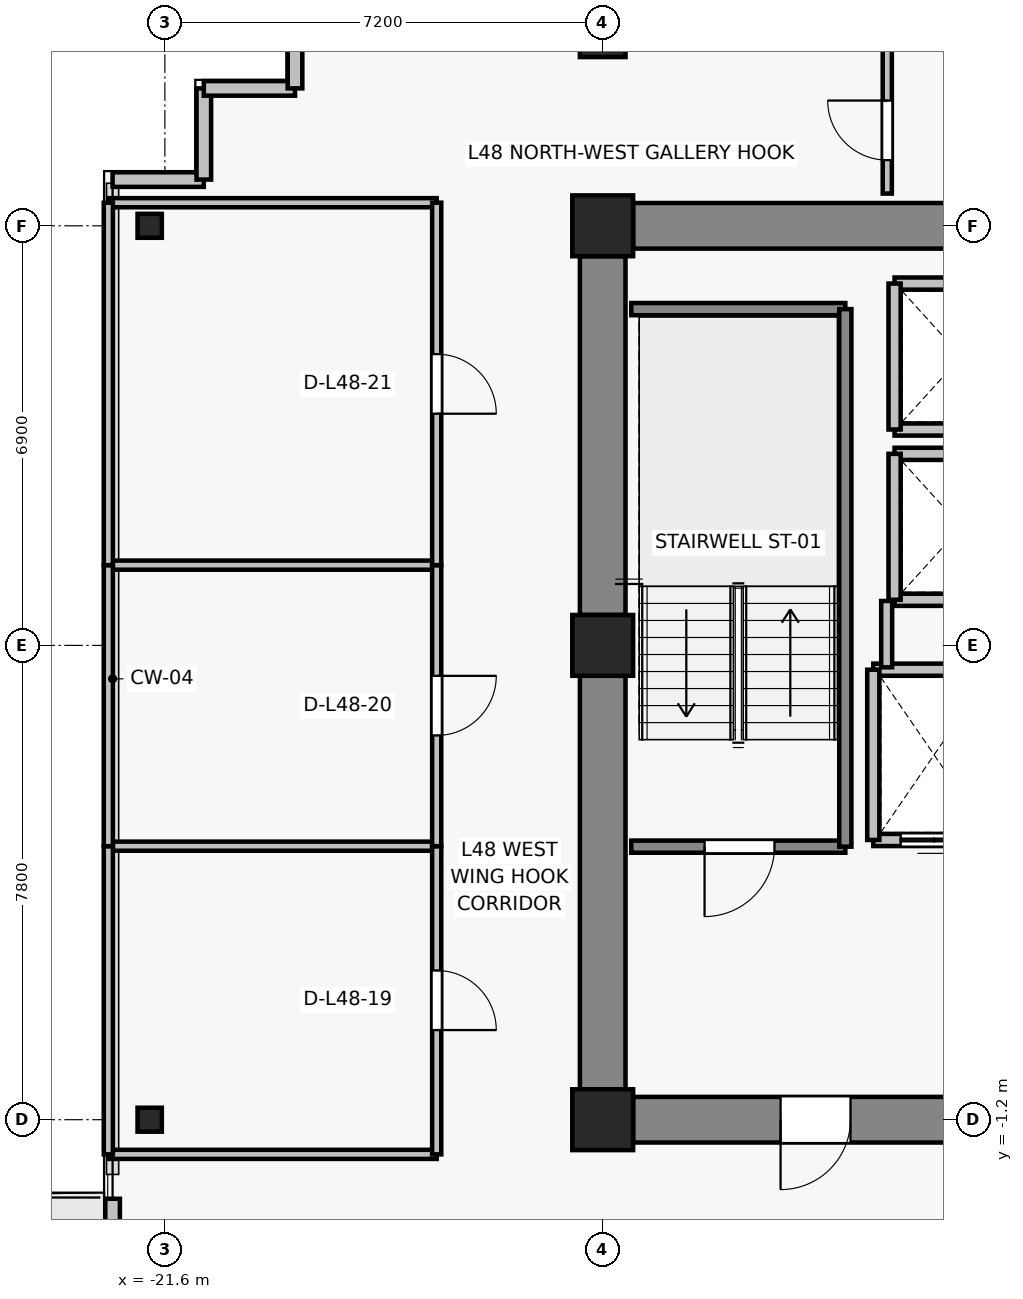
"""IFC4 building model, lengths in metres.
Left out: names, types, materials, properties, quantities, classifications, styles, units other than length and angle.
Written with IfcOpenShell. Run it as: python <this file> out.ifc"""

import sys

from ifc_helpers import new_model, si_unit, direction, frame, frame_2d, origin, origin_2d, place, context, subcontext, project, spatial, rectangle, i_section, extrude, source, transform, mapped, element, fill, save


model = new_model("IFC4")
c1 = context("Model", 3, precision=1e-05, world=origin(), true_north=direction((0.0, 1.0)))
c2 = subcontext(c1, "Body", "Model", "MODEL_VIEW")
j1 = project(units=[si_unit("LENGTHUNIT", "METRE"), si_unit("PLANEANGLEUNIT", "RADIAN")], contexts=[c1])
p1 = place(None, origin())
s1 = spatial("IfcSite", under=j1, at=p1, CompositionType="ELEMENT")
p2 = place(p1, origin())
s2 = spatial("IfcBuilding", under=s1, at=p2, CompositionType="ELEMENT")
p3 = place(p2, frame((0.0, 0.0, 172.6)))
s3 = spatial("IfcBuildingStorey", under=s2, at=p3, CompositionType="ELEMENT", Elevation=172.6)
for number, where, z_axis, x_axis in (
    (1, (-14.4, -1.2, 0.0), (0.0, 0.0, 1.0), (1.0, 0.0, 0.0)),
    (2, (-14.4, 6.6, 0.0), (0.0, 0.0, 1.0), (1.0, 0.0, 0.0)),
    (3, (-14.4, 13.5, 0.0), (0.0, 0.0, 1.0), (1.0, 0.0, 0.0)),
):
    element("IfcColumn", number, at=place(p3, frame(where, z_axis=z_axis, x_axis=x_axis)), inside=s3, PredefinedType="COLUMN", context=c2, shape_type="SweptSolid", body=[
        extrude(rectangle(XDim=1.0, YDim=1.0, at=origin_2d()), origin(), (0.0, 0.0, 1.0), 3.3),
    ])
p4 = place(p3, frame((-14.4, 16.65, 0.0), z_axis=(0.0, 0.0, 1.0), x_axis=(1.0, 0.0, 0.0)))
e4 = element("IfcColumn", 4, at=p4, inside=s3, PredefinedType="COLUMN", context=c2, shape_type="SweptSolid", body=[
    extrude(rectangle(XDim=0.75, YDim=0.75, at=origin_2d()), origin(), (0.0, 0.0, 1.0), 3.3),
])
for number, where, z_axis, x_axis in (
    (5, (-21.85, -1.2, 0.0), (0.0, 0.0, 1.0), (1.0, 0.0, 0.0)),
    (6, (-21.85, 13.5, 0.0), (0.0, 0.0, 1.0), (1.0, 0.0, 0.0)),
):
    element("IfcColumn", number, at=place(p3, frame(where, z_axis=z_axis, x_axis=x_axis)), inside=s3, PredefinedType="COLUMN", context=c2, shape_type="SweptSolid", body=[
        extrude(i_section(OverallWidth=0.399, OverallDepth=0.394, WebThickness=0.023, FlangeThickness=0.037, FilletRadius=0.015, at=origin_2d()), origin(), (0.0, 0.0, 1.0), 3.3),
    ])
p5 = place(p3, frame((-13.9, 13.5, 0.0), z_axis=(0.0, 0.0, 1.0), x_axis=(1.0, 0.0, 0.0)))
e7 = element("IfcWall", 7, at=p5, inside=s3, PredefinedType="SHEAR", context=c2, shape_type="SweptSolid", body=[
    extrude(rectangle(XDim=6.2, YDim=0.75, at=frame_2d((3.1, 0.0))), origin(), (0.0, 0.0, 1.0), 3.075),
])
p6 = place(p3, frame((-14.4, -0.7, 0.0), z_axis=(0.0, 0.0, 1.0), x_axis=(0.0, 1.0, 0.0)))
e8 = element("IfcWall", 8, at=p6, inside=s3, PredefinedType="SHEAR", context=c2, shape_type="SweptSolid", body=[
    extrude(rectangle(XDim=6.8, YDim=0.75, at=frame_2d((3.4, 0.0))), origin(), (0.0, 0.0, 1.0), 3.075),
])
p7 = place(p3, frame((-14.4, 7.1, 0.0), z_axis=(0.0, 0.0, 1.0), x_axis=(0.0, 1.0, 0.0)))
e9 = element("IfcWall", 9, at=p7, inside=s3, PredefinedType="SHEAR", context=c2, shape_type="SweptSolid", body=[
    extrude(rectangle(XDim=5.9, YDim=0.75, at=frame_2d((2.95, 0.0))), origin(), (0.0, 0.0, 1.0), 3.075),
])
p8 = place(p3, frame((-7.7, -1.2, 0.0), z_axis=(0.0, 0.0, 1.0), x_axis=(-1.0, 0.0, 0.0)))
e10 = element("IfcWall", 10, at=p8, inside=s3, PredefinedType="SHEAR", context=c2, shape_type="SweptSolid", body=[
    extrude(rectangle(XDim=6.2, YDim=0.75, at=frame_2d((3.1, 0.0))), origin(), (0.0, 0.0, 1.0), 3.075),
])
p9 = place(p8, frame((2.625, 0.0, 0.0)))
e11 = element("IfcOpeningElement", 11, at=p9, cuts=e10, PredefinedType="OPENING", context=c2, shape_type="SweptSolid", body=[
    extrude(rectangle(XDim=1.15, YDim=2.15, at=frame_2d((0.575, 1.075))), frame((0.0, 0.385, 0.0), z_axis=(0.0, -1.0, 0.0), x_axis=(1.0, 0.0, 0.0)), (0.0, 0.0, 1.0), 0.77),
])
p10 = place(p3, frame((-22.46, -8.3, 0.0), z_axis=(0.0, 0.0, 1.0), x_axis=(0.0, 1.0, 0.0)))
e12 = element("IfcWall", 12, at=p10, inside=s3, PredefinedType="SOLIDWALL", context=c2, shape_type="SweptSolid", body=[
    extrude(rectangle(XDim=5.8, YDim=0.24, at=frame_2d((2.9, 0.0))), origin(), (0.0, 0.0, 1.0), 3.075),
])
p11 = place(p10, frame((0.696, 0.0, 0.0)))
e13 = element("IfcOpeningElement", 13, at=p11, cuts=e12, PredefinedType="OPENING", context=c2, shape_type="SweptSolid", body=[
    extrude(rectangle(XDim=1.0, YDim=2.2, at=frame_2d((0.5, 1.1))), frame((0.0, 0.13, 0.0), z_axis=(0.0, -1.0, 0.0), x_axis=(1.0, 0.0, 0.0)), (0.0, 0.0, 1.0), 0.26),
])
p12 = place(p10, frame((2.046, 0.0, 0.85)))
e14 = element("IfcOpeningElement", 14, at=p12, cuts=e12, PredefinedType="OPENING", context=c2, shape_type="SweptSolid", body=[
    extrude(rectangle(XDim=0.9, YDim=1.35, at=frame_2d((0.45, 0.675))), frame((0.0, 0.13, 0.0), z_axis=(0.0, -1.0, 0.0), x_axis=(1.0, 0.0, 0.0)), (0.0, 0.0, 1.0), 0.26),
])
for number, where, z_axis, x_axis in (
    (15, (-20.96, 14.26, 0.0), (0.0, 0.0, 1.0), (-1.0, 0.0, 0.0)),
    (16, (-20.96, 15.76, 0.0), (0.0, 0.0, 1.0), (0.0, -1.0, 0.0)),
    (17, (-19.46, 15.76, 0.0), (0.0, 0.0, 1.0), (-1.0, 0.0, 0.0)),
    (18, (-19.46, 17.26, 0.0), (0.0, 0.0, 1.0), (0.0, -1.0, 0.0)),
):
    element("IfcWall", number, at=place(p3, frame(where, z_axis=z_axis, x_axis=x_axis)), inside=s3, PredefinedType="SOLIDWALL", context=c2, shape_type="SweptSolid", body=[
        extrude(rectangle(XDim=1.5, YDim=0.24, at=frame_2d((0.75, 0.0))), origin(), (0.0, 0.0, 1.0), 3.075),
    ])
p13 = place(p3, frame((-7.95, 3.4, 0.0), z_axis=(0.0, 0.0, 1.0), x_axis=(-1.0, 0.0, 0.0)))
e19 = element("IfcWall", 19, at=p13, inside=s3, PredefinedType="SOLIDWALL", context=c2, shape_type="SweptSolid", body=[
    extrude(rectangle(XDim=2.0, YDim=0.2, at=frame_2d((1.0, 0.0))), origin(), (0.0, 0.0, 1.0), 3.075),
])
p14 = place(p13, frame((0.45, 0.0, 0.0)))
e20 = element("IfcOpeningElement", 20, at=p14, cuts=e19, PredefinedType="OPENING", context=c2, shape_type="SweptSolid", body=[
    extrude(rectangle(XDim=1.1, YDim=2.2, at=frame_2d((0.55, 1.1))), frame((0.0, 0.11, 0.0), z_axis=(0.0, -1.0, 0.0), x_axis=(1.0, 0.0, 0.0)), (0.0, 0.0, 1.0), 0.22),
])
p15 = place(p3, frame((-9.95, 6.2, 0.0), z_axis=(0.0, 0.0, 1.0), x_axis=(1.0, 0.0, 0.0)))
e21 = element("IfcWall", 21, at=p15, inside=s3, PredefinedType="SOLIDWALL", context=c2, shape_type="SweptSolid", body=[
    extrude(rectangle(XDim=2.0, YDim=0.2, at=frame_2d((1.0, 0.0))), origin(), (0.0, 0.0, 1.0), 3.075),
])
p16 = place(p3, frame((-9.95, 3.4, 0.0), z_axis=(0.0, 0.0, 1.0), x_axis=(0.0, 1.0, 0.0)))
e22 = element("IfcWall", 22, at=p16, inside=s3, PredefinedType="SOLIDWALL", context=c2, shape_type="SweptSolid", body=[
    extrude(rectangle(XDim=2.8, YDim=0.2, at=frame_2d((1.4, 0.0))), origin(), (0.0, 0.0, 1.0), 3.075),
])
for number, where, z_axis, x_axis in (
    (23, (-7.4, 7.35, 0.0), (0.0, 0.0, 1.0), (-1.0, 0.0, 0.0)),
    (24, (-9.6, 9.75, 0.0), (0.0, 0.0, 1.0), (1.0, 0.0, 0.0)),
):
    element("IfcWall", number, at=place(p3, frame(where, z_axis=z_axis, x_axis=x_axis)), inside=s3, PredefinedType="SOLIDWALL", context=c2, shape_type="SweptSolid", body=[
        extrude(rectangle(XDim=2.2, YDim=0.2, at=frame_2d((1.1, 0.0))), origin(), (0.0, 0.0, 1.0), 2.565),
    ])
p17 = place(p3, frame((-9.6, 7.35, 0.0), z_axis=(0.0, 0.0, 1.0), x_axis=(0.0, 1.0, 0.0)))
e25 = element("IfcWall", 25, at=p17, inside=s3, PredefinedType="SOLIDWALL", context=c2, shape_type="SweptSolid", body=[
    extrude(rectangle(XDim=2.4, YDim=0.2, at=frame_2d((1.2, 0.0))), origin(), (0.0, 0.0, 1.0), 3.075),
])
for number, where, z_axis, x_axis in (
    (26, (-7.4, 10.15, 0.0), (0.0, 0.0, 1.0), (-1.0, 0.0, 0.0)),
    (27, (-9.6, 12.55, 0.0), (0.0, 0.0, 1.0), (1.0, 0.0, 0.0)),
):
    element("IfcWall", number, at=place(p3, frame(where, z_axis=z_axis, x_axis=x_axis)), inside=s3, PredefinedType="SOLIDWALL", context=c2, shape_type="SweptSolid", body=[
        extrude(rectangle(XDim=2.2, YDim=0.2, at=frame_2d((1.1, 0.0))), origin(), (0.0, 0.0, 1.0), 2.565),
    ])
p18 = place(p3, frame((-9.6, 10.15, 0.0), z_axis=(0.0, 0.0, 1.0), x_axis=(0.0, 1.0, 0.0)))
e28 = element("IfcWall", 28, at=p18, inside=s3, PredefinedType="SOLIDWALL", context=c2, shape_type="SweptSolid", body=[
    extrude(rectangle(XDim=2.4, YDim=0.2, at=frame_2d((1.2, 0.0))), origin(), (0.0, 0.0, 1.0), 3.075),
])
p19 = place(p3, frame((-10.41, 3.29, 0.0), z_axis=(0.0, 0.0, 1.0), x_axis=(-1.0, 0.0, 0.0)))
e29 = element("IfcWall", 29, at=p19, inside=s3, PredefinedType="SOLIDWALL", context=c2, shape_type="SweptSolid", body=[
    extrude(rectangle(XDim=3.52, YDim=0.2, at=frame_2d((1.76, 0.0))), origin(), (0.0, 0.0, 1.0), 3.075),
])
p20 = place(p19, frame((1.165, 0.0, 0.0)))
e30 = element("IfcOpeningElement", 30, at=p20, cuts=e29, PredefinedType="OPENING", context=c2, shape_type="SweptSolid", body=[
    extrude(rectangle(XDim=1.15, YDim=2.15, at=frame_2d((0.575, 1.075))), frame((0.0, 0.11, 0.0), z_axis=(0.0, -1.0, 0.0), x_axis=(1.0, 0.0, 0.0)), (0.0, 0.0, 1.0), 0.22),
])
p21 = place(p3, frame((-13.93, 12.13, 0.0), z_axis=(0.0, 0.0, 1.0), x_axis=(1.0, 0.0, 0.0)))
e31 = element("IfcWall", 31, at=p21, inside=s3, PredefinedType="SOLIDWALL", context=c2, shape_type="SweptSolid", body=[
    extrude(rectangle(XDim=3.52, YDim=0.2, at=frame_2d((1.76, 0.0))), origin(), (0.0, 0.0, 1.0), 3.075),
])
p22 = place(p3, frame((-10.41, 12.13, 0.0), z_axis=(0.0, 0.0, 1.0), x_axis=(0.0, -1.0, 0.0)))
e32 = element("IfcWall", 32, at=p22, inside=s3, PredefinedType="SOLIDWALL", context=c2, shape_type="SweptSolid", body=[
    extrude(rectangle(XDim=8.84, YDim=0.2, at=frame_2d((4.42, 0.0))), origin(), (0.0, 0.0, 1.0), 3.075),
])
p23 = place(p3, frame((-9.73, 6.24, 0.0), z_axis=(0.0, 0.0, 1.0), x_axis=(0.0, 1.0, 0.0)))
e33 = element("IfcWall", 33, at=p23, inside=s3, PredefinedType="PARTITIONING", context=c2, shape_type="SweptSolid", body=[
    extrude(rectangle(XDim=1.09, YDim=0.18, at=frame_2d((0.545, 0.0))), origin(), (0.0, 0.0, 1.0), 3.075),
])
for number, where, z_axis, x_axis in (
    (34, (-17.13, -1.77, 0.0), (0.0, 0.0, 1.0), (-1.0, 0.0, 0.0)),
    (35, (-22.53, 3.298, 0.0), (0.0, 0.0, 1.0), (1.0, 0.0, 0.0)),
):
    element("IfcWall", number, at=place(p3, frame(where, z_axis=z_axis, x_axis=x_axis)), inside=s3, PredefinedType="PARTITIONING", context=c2, shape_type="SweptSolid", body=[
        extrude(rectangle(XDim=5.4, YDim=0.15, at=frame_2d((2.7, 0.0))), origin(), (0.0, 0.0, 1.0), 2.565),
    ])
p24 = place(p3, frame((-22.53, -1.77, 0.0), z_axis=(0.0, 0.0, 1.0), x_axis=(0.0, 1.0, 0.0)))
e36 = element("IfcWall", 36, at=p24, inside=s3, PredefinedType="PARTITIONING", context=c2, shape_type="SweptSolid", body=[
    extrude(rectangle(XDim=5.068, YDim=0.15, at=frame_2d((2.534, 0.0))), origin(), (0.0, 0.0, 1.0), 3.075),
])
p25 = place(p3, frame((-17.13, 3.298, 0.0), z_axis=(0.0, 0.0, 1.0), x_axis=(0.0, -1.0, 0.0)))
e37 = element("IfcWall", 37, at=p25, inside=s3, PredefinedType="PARTITIONING", context=c2, shape_type="SweptSolid", body=[
    extrude(rectangle(XDim=5.068, YDim=0.15, at=frame_2d((2.534, 0.0))), origin(), (0.0, 0.0, 1.0), 2.565),
])
p26 = place(p25, frame((2.044, 0.0, 0.0)))
e38 = element("IfcOpeningElement", 38, at=p26, cuts=e37, PredefinedType="OPENING", context=c2, shape_type="SweptSolid", body=[
    extrude(rectangle(XDim=0.98, YDim=2.15, at=frame_2d((0.49, 1.075))), frame((0.0, 0.085, 0.0), z_axis=(0.0, -1.0, 0.0), x_axis=(1.0, 0.0, 0.0)), (0.0, 0.0, 1.0), 0.17),
])
p27 = place(p3, frame((-22.53, 7.92, 0.0), z_axis=(0.0, 0.0, 1.0), x_axis=(1.0, 0.0, 0.0)))
e39 = element("IfcWall", 39, at=p27, inside=s3, PredefinedType="PARTITIONING", context=c2, shape_type="SweptSolid", body=[
    extrude(rectangle(XDim=5.4, YDim=0.15, at=frame_2d((2.7, 0.0))), origin(), (0.0, 0.0, 1.0), 2.565),
])
p28 = place(p3, frame((-22.53, 3.298, 0.0), z_axis=(0.0, 0.0, 1.0), x_axis=(0.0, 1.0, 0.0)))
e40 = element("IfcWall", 40, at=p28, inside=s3, PredefinedType="PARTITIONING", context=c2, shape_type="SweptSolid", body=[
    extrude(rectangle(XDim=4.622, YDim=0.15, at=frame_2d((2.311, 0.0))), origin(), (0.0, 0.0, 1.0), 3.075),
])
p29 = place(p3, frame((-17.13, 7.92, 0.0), z_axis=(0.0, 0.0, 1.0), x_axis=(0.0, -1.0, 0.0)))
e41 = element("IfcWall", 41, at=p29, inside=s3, PredefinedType="PARTITIONING", context=c2, shape_type="SweptSolid", body=[
    extrude(rectangle(XDim=4.622, YDim=0.15, at=frame_2d((2.311, 0.0))), origin(), (0.0, 0.0, 1.0), 3.075),
])
p30 = place(p29, frame((1.821, 0.0, 0.0)))
e42 = element("IfcOpeningElement", 42, at=p30, cuts=e41, PredefinedType="OPENING", context=c2, shape_type="SweptSolid", body=[
    extrude(rectangle(XDim=0.98, YDim=2.15, at=frame_2d((0.49, 1.075))), frame((0.0, 0.085, 0.0), z_axis=(0.0, -1.0, 0.0), x_axis=(1.0, 0.0, 0.0)), (0.0, 0.0, 1.0), 0.17),
])
p31 = place(p3, frame((-22.53, 13.88, 0.0), z_axis=(0.0, 0.0, 1.0), x_axis=(1.0, 0.0, 0.0)))
e43 = element("IfcWall", 43, at=p31, inside=s3, PredefinedType="PARTITIONING", context=c2, shape_type="SweptSolid", body=[
    extrude(rectangle(XDim=5.4, YDim=0.15, at=frame_2d((2.7, 0.0))), origin(), (0.0, 0.0, 1.0), 3.075),
])
p32 = place(p3, frame((-22.53, 7.92, 0.0), z_axis=(0.0, 0.0, 1.0), x_axis=(0.0, 1.0, 0.0)))
e44 = element("IfcWall", 44, at=p32, inside=s3, PredefinedType="PARTITIONING", context=c2, shape_type="SweptSolid", body=[
    extrude(rectangle(XDim=5.96, YDim=0.15, at=frame_2d((2.98, 0.0))), origin(), (0.0, 0.0, 1.0), 3.075),
])
p33 = place(p3, frame((-17.13, 13.88, 0.0), z_axis=(0.0, 0.0, 1.0), x_axis=(0.0, -1.0, 0.0)))
e45 = element("IfcWall", 45, at=p33, inside=s3, PredefinedType="PARTITIONING", context=c2, shape_type="SweptSolid", body=[
    extrude(rectangle(XDim=5.96, YDim=0.15, at=frame_2d((2.98, 0.0))), origin(), (0.0, 0.0, 1.0), 2.565),
])
p34 = place(p33, frame((2.49, 0.0, 0.0)))
e46 = element("IfcOpeningElement", 46, at=p34, cuts=e45, PredefinedType="OPENING", context=c2, shape_type="SweptSolid", body=[
    extrude(rectangle(XDim=0.98, YDim=2.15, at=frame_2d((0.49, 1.075))), frame((0.0, 0.085, 0.0), z_axis=(0.0, -1.0, 0.0), x_axis=(1.0, 0.0, 0.0)), (0.0, 0.0, 1.0), 0.17),
])
p35 = place(p3, frame((-9.72, 14.03, 0.0), z_axis=(0.0, 0.0, 1.0), x_axis=(0.0, 1.0, 0.0)))
e47 = element("IfcWall", 47, at=p35, inside=s3, PredefinedType="PARTITIONING", context=c2, shape_type="SweptSolid", body=[
    extrude(rectangle(XDim=3.3, YDim=0.15, at=frame_2d((1.65, 0.0))), origin(), (0.0, 0.0, 1.0), 2.565),
])
p36 = place(p35, frame((0.55, 0.0, 0.0)))
e48 = element("IfcOpeningElement", 48, at=p36, cuts=e47, PredefinedType="OPENING", context=c2, shape_type="SweptSolid", body=[
    extrude(rectangle(XDim=0.98, YDim=2.15, at=frame_2d((0.49, 1.075))), frame((0.0, 0.085, 0.0), z_axis=(0.0, -1.0, 0.0), x_axis=(1.0, 0.0, 0.0)), (0.0, 0.0, 1.0), 0.17),
])
m1 = source(origin(), c2, "Body", "SweptSolid", [
    extrude(rectangle(XDim=1.1, YDim=2.2, at=frame_2d((0.55, 1.1))), frame((0.0, 0.025, 0.0), z_axis=(0.0, -1.0, 0.0), x_axis=(1.0, 0.0, 0.0)), (0.0, 0.0, 1.0), 0.05),
])
p37 = place(p14, origin())
e49 = element("IfcDoor", 49, at=p37, inside=s3, OperationType="DOUBLE_DOOR_SLIDING", PredefinedType="DOOR", context=c2, shape_type="MappedRepresentation", body=[
    mapped(m1, transform((0.0, 0.0, 0.0), x_axis=(1.0, 0.0, 0.0), y_axis=(0.0, 1.0, 0.0), z_axis=(0.0, 0.0, 1.0), scale=1.0)),
])
fill(e20, e49)
m2 = source(origin(), c2, "Body", "SweptSolid", [
    extrude(rectangle(XDim=1.15, YDim=2.15, at=frame_2d((0.575, 1.075))), frame((0.0, 0.025, 0.0), z_axis=(0.0, -1.0, 0.0), x_axis=(1.0, 0.0, 0.0)), (0.0, 0.0, 1.0), 0.05),
])
p38 = place(p20, origin())
e50 = element("IfcDoor", 50, at=p38, inside=s3, OperationType="SINGLE_SWING_RIGHT", PredefinedType="DOOR", context=c2, shape_type="MappedRepresentation", body=[
    mapped(m2, transform((0.0, 0.0, 0.0), x_axis=(1.0, 0.0, 0.0), y_axis=(0.0, 1.0, 0.0), z_axis=(0.0, 0.0, 1.0), scale=1.0)),
])
fill(e30, e50)
p39 = place(p9, origin())
e51 = element("IfcDoor", 51, at=p39, inside=s3, OperationType="SINGLE_SWING_RIGHT", PredefinedType="DOOR", context=c2, shape_type="MappedRepresentation", body=[
    mapped(m2, transform((0.0, 0.0, 0.0), x_axis=(1.0, 0.0, 0.0), y_axis=(0.0, 1.0, 0.0), z_axis=(0.0, 0.0, 1.0), scale=1.0)),
])
fill(e11, e51)
m3 = source(origin(), c2, "Body", "SweptSolid", [
    extrude(rectangle(XDim=0.98, YDim=2.15, at=frame_2d((0.49, 1.075))), frame((0.0, 0.025, 0.0), z_axis=(0.0, -1.0, 0.0), x_axis=(1.0, 0.0, 0.0)), (0.0, 0.0, 1.0), 0.05),
])
p40 = place(p26, origin())
e52 = element("IfcDoor", 52, at=p40, inside=s3, OperationType="SINGLE_SWING_RIGHT", PredefinedType="DOOR", context=c2, shape_type="MappedRepresentation", body=[
    mapped(m3, transform((0.0, 0.0, 0.0), x_axis=(1.0, 0.0, 0.0), y_axis=(0.0, 1.0, 0.0), z_axis=(0.0, 0.0, 1.0), scale=1.0)),
])
fill(e38, e52)
p41 = place(p30, origin())
e53 = element("IfcDoor", 53, at=p41, inside=s3, OperationType="SINGLE_SWING_LEFT", PredefinedType="DOOR", context=c2, shape_type="MappedRepresentation", body=[
    mapped(m3, transform((0.0, 0.0, 0.0), x_axis=(1.0, 0.0, 0.0), y_axis=(0.0, 1.0, 0.0), z_axis=(0.0, 0.0, 1.0), scale=1.0)),
])
fill(e42, e53)
p42 = place(p34, origin())
e54 = element("IfcDoor", 54, at=p42, inside=s3, OperationType="SINGLE_SWING_RIGHT", PredefinedType="DOOR", context=c2, shape_type="MappedRepresentation", body=[
    mapped(m3, transform((0.0, 0.0, 0.0), x_axis=(1.0, 0.0, 0.0), y_axis=(0.0, 1.0, 0.0), z_axis=(0.0, 0.0, 1.0), scale=1.0)),
])
fill(e46, e54)
p43 = place(p36, origin())
e55 = element("IfcDoor", 55, at=p43, inside=s3, OperationType="SINGLE_SWING_RIGHT", PredefinedType="DOOR", context=c2, shape_type="MappedRepresentation", body=[
    mapped(m3, transform((0.0, 0.0, 0.0), x_axis=(1.0, 0.0, 0.0), y_axis=(0.0, 1.0, 0.0), z_axis=(0.0, 0.0, 1.0), scale=1.0)),
])
fill(e48, e55)
save(model, sys.argv[1])
